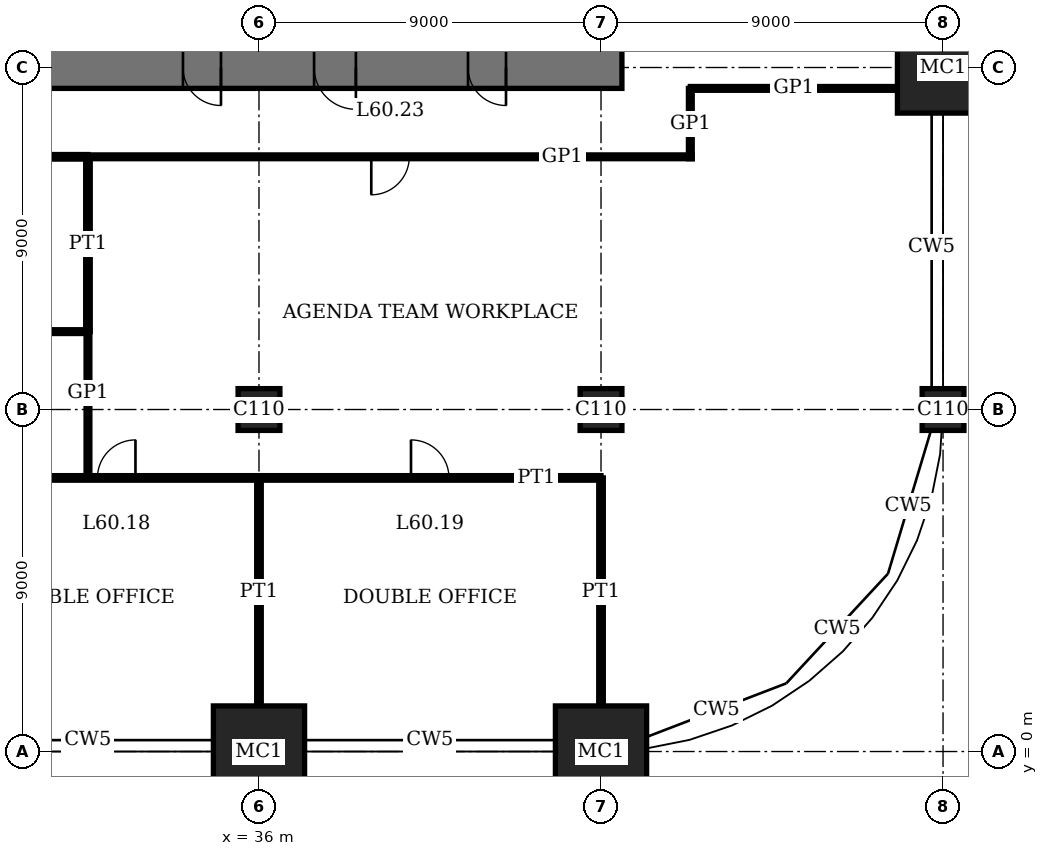
"""IFC4 building model, lengths in metres.
Left out: names, types, materials, properties, quantities, classifications, styles, units other than length and angle.
Written with IfcOpenShell. Run it as: python <this file> out.ifc"""

import sys

from ifc_helpers import new_model, si_unit, direction, frame, frame_2d, origin, origin_2d, place, context, subcontext, project, spatial, rectangle, extrude, element, fill, save


model = new_model("IFC4")
c1 = context("Model", 3, precision=1e-05, world=origin(), true_north=direction((0.0, 1.0)))
c2 = subcontext(c1, "Body", "Model", "MODEL_VIEW")
j1 = project(units=[si_unit("LENGTHUNIT", "METRE"), si_unit("PLANEANGLEUNIT", "RADIAN")], contexts=[c1])
p1 = place(None, origin())
s1 = spatial("IfcSite", under=j1, at=p1, CompositionType="ELEMENT")
p2 = place(p1, origin())
s2 = spatial("IfcBuilding", under=s1, at=p2, CompositionType="ELEMENT")
p3 = place(p2, frame((0.0, 0.0, 247.4)))
s3 = spatial("IfcBuildingStorey", under=s2, at=p3, CompositionType="ELEMENT", Elevation=247.4)
p4 = place(p3, frame((36.0, 0.0, 0.0), z_axis=(0.0, 0.0, 1.0), x_axis=(1.0, 0.0, 0.0)))
e1 = element("IfcColumn", 1, at=p4, inside=s3, PredefinedType="COLUMN", context=c2, shape_type="SweptSolid", body=[
    extrude(rectangle(XDim=2.4, YDim=2.4, at=origin_2d()), origin(), (0.0, 0.0, 1.0), 4.0),
])
p5 = place(p3, frame((36.0, 9.0, 0.0), z_axis=(0.0, 0.0, 1.0), x_axis=(1.0, 0.0, 0.0)))
e2 = element("IfcColumn", 2, at=p5, inside=s3, PredefinedType="COLUMN", context=c2, shape_type="SweptSolid", body=[
    extrude(rectangle(XDim=1.1, YDim=1.1, at=origin_2d()), origin(), (0.0, 0.0, 1.0), 4.0),
])
p6 = place(p3, frame((45.0, 0.0, 0.0), z_axis=(0.0, 0.0, 1.0), x_axis=(1.0, 0.0, 0.0)))
e3 = element("IfcColumn", 3, at=p6, inside=s3, PredefinedType="COLUMN", context=c2, shape_type="SweptSolid", body=[
    extrude(rectangle(XDim=2.4, YDim=2.4, at=origin_2d()), origin(), (0.0, 0.0, 1.0), 4.0),
])
for number, where, z_axis, x_axis in (
    (4, (45.0, 9.0, 0.0), (0.0, 0.0, 1.0), (1.0, 0.0, 0.0)),
    (5, (54.0, 9.0, 0.0), (0.0, 0.0, 1.0), (1.0, 0.0, 0.0)),
):
    element("IfcColumn", number, at=place(p3, frame(where, z_axis=z_axis, x_axis=x_axis)), inside=s3, PredefinedType="COLUMN", context=c2, shape_type="SweptSolid", body=[
        extrude(rectangle(XDim=1.1, YDim=1.1, at=origin_2d()), origin(), (0.0, 0.0, 1.0), 4.0),
    ])
p7 = place(p3, frame((54.0, 18.0, 0.0), z_axis=(0.0, 0.0, 1.0), x_axis=(1.0, 0.0, 0.0)))
e6 = element("IfcColumn", 6, at=p7, inside=s3, PredefinedType="COLUMN", context=c2, shape_type="SweptSolid", body=[
    extrude(rectangle(XDim=2.4, YDim=2.4, at=origin_2d()), origin(), (0.0, 0.0, 1.0), 4.0),
])
p8 = place(p3, frame((17.45, 18.0, 0.0), z_axis=(0.0, 0.0, 1.0), x_axis=(1.0, 0.0, 0.0)))
e7 = element("IfcWall", 7, at=p8, inside=s3, PredefinedType="SHEAR", context=c2, shape_type="SweptSolid", body=[
    extrude(rectangle(XDim=28.1, YDim=1.1, at=frame_2d((14.05, 0.0))), origin(), (0.0, 0.0, 1.0), 4.0),
])
p9 = place(p8, frame((11.55, 0.0, 0.0)))
e8 = element("IfcOpeningElement", 8, at=p9, cuts=e7, PredefinedType="OPENING", context=c2, shape_type="SweptSolid", body=[
    extrude(rectangle(XDim=1.0, YDim=2.4, at=frame_2d((0.5, 1.2))), frame((0.0, 0.56, 0.0), z_axis=(0.0, -1.0, 0.0), x_axis=(1.0, 0.0, 0.0)), (0.0, 0.0, 1.0), 1.12),
])
p10 = place(p8, frame((16.55, 0.0, 0.0)))
e9 = element("IfcOpeningElement", 9, at=p10, cuts=e7, PredefinedType="OPENING", context=c2, shape_type="SweptSolid", body=[
    extrude(rectangle(XDim=1.0, YDim=2.4, at=frame_2d((0.5, 1.2))), frame((0.0, 0.56, 0.0), z_axis=(0.0, -1.0, 0.0), x_axis=(1.0, 0.0, 0.0)), (0.0, 0.0, 1.0), 1.12),
])
p11 = place(p8, frame((20.0, 0.0, 0.0)))
e10 = element("IfcOpeningElement", 10, at=p11, cuts=e7, PredefinedType="OPENING", context=c2, shape_type="SweptSolid", body=[
    extrude(rectangle(XDim=1.1, YDim=2.4, at=frame_2d((0.55, 1.2))), frame((0.0, 0.56, 0.0), z_axis=(0.0, -1.0, 0.0), x_axis=(1.0, 0.0, 0.0)), (0.0, 0.0, 1.0), 1.12),
])
p12 = place(p8, frame((24.05, 0.0, 0.0)))
e11 = element("IfcOpeningElement", 11, at=p12, cuts=e7, PredefinedType="OPENING", context=c2, shape_type="SweptSolid", body=[
    extrude(rectangle(XDim=1.0, YDim=2.4, at=frame_2d((0.5, 1.2))), frame((0.0, 0.56, 0.0), z_axis=(0.0, -1.0, 0.0), x_axis=(1.0, 0.0, 0.0)), (0.0, 0.0, 1.0), 1.12),
])
p13 = place(p3, frame((27.0, 7.2, 0.0), z_axis=(0.0, 0.0, 1.0), x_axis=(1.0, 0.0, 0.0)))
e12 = element("IfcWall", 12, at=p13, inside=s3, PredefinedType="PARTITIONING", context=c2, shape_type="SweptSolid", body=[
    extrude(rectangle(XDim=9.0, YDim=0.12, at=frame_2d((4.5, 0.0))), origin(), (0.0, 0.0, 1.0), 3.75),
])
p14 = place(p13, frame((4.75, 0.0, 0.0)))
e13 = element("IfcOpeningElement", 13, at=p14, cuts=e12, PredefinedType="OPENING", context=c2, shape_type="SweptSolid", body=[
    extrude(rectangle(XDim=1.0, YDim=2.4, at=frame_2d((0.5, 1.2))), frame((0.0, 0.07, 0.0), z_axis=(0.0, -1.0, 0.0), x_axis=(1.0, 0.0, 0.0)), (0.0, 0.0, 1.0), 0.14),
])
p15 = place(p3, frame((36.0, 7.2, 0.0), z_axis=(0.0, 0.0, 1.0), x_axis=(1.0, 0.0, 0.0)))
e14 = element("IfcWall", 14, at=p15, inside=s3, PredefinedType="PARTITIONING", context=c2, shape_type="SweptSolid", body=[
    extrude(rectangle(XDim=9.0, YDim=0.12, at=frame_2d((4.5, 0.0))), origin(), (0.0, 0.0, 1.0), 3.75),
])
p16 = place(p15, frame((4.0, 0.0, 0.0)))
e15 = element("IfcOpeningElement", 15, at=p16, cuts=e14, PredefinedType="OPENING", context=c2, shape_type="SweptSolid", body=[
    extrude(rectangle(XDim=1.0, YDim=2.4, at=frame_2d((0.5, 1.2))), frame((0.0, 0.07, 0.0), z_axis=(0.0, -1.0, 0.0), x_axis=(1.0, 0.0, 0.0)), (0.0, 0.0, 1.0), 0.14),
])
p17 = place(p3, frame((22.5, 11.05, 0.0), z_axis=(0.0, 0.0, 1.0), x_axis=(1.0, 0.0, 0.0)))
e16 = element("IfcWall", 16, at=p17, inside=s3, PredefinedType="PARTITIONING", context=c2, shape_type="SweptSolid", body=[
    extrude(rectangle(XDim=9.0, YDim=0.1, at=frame_2d((4.5, 0.0))), origin(), (0.0, 0.0, 1.0), 3.75),
])
p18 = place(p17, frame((4.0, 0.0, 0.0)))
e17 = element("IfcOpeningElement", 17, at=p18, cuts=e16, PredefinedType="OPENING", context=c2, shape_type="SweptSolid", body=[
    extrude(rectangle(XDim=1.0, YDim=2.4, at=frame_2d((0.5, 1.2))), frame((0.0, 0.06, 0.0), z_axis=(0.0, -1.0, 0.0), x_axis=(1.0, 0.0, 0.0)), (0.0, 0.0, 1.0), 0.12),
])
p19 = place(p3, frame((22.5, 15.65, 0.0), z_axis=(0.0, 0.0, 1.0), x_axis=(1.0, 0.0, 0.0)))
e18 = element("IfcWall", 18, at=p19, inside=s3, PredefinedType="PARTITIONING", context=c2, shape_type="SweptSolid", body=[
    extrude(rectangle(XDim=9.0, YDim=0.12, at=frame_2d((4.5, 0.0))), origin(), (0.0, 0.0, 1.0), 3.75),
])
p20 = place(p3, frame((31.51, 15.65, 0.0), z_axis=(0.0, 0.0, 1.0), x_axis=(1.0, 0.0, 0.0)))
e19 = element("IfcWall", 19, at=p20, inside=s3, PredefinedType="PARTITIONING", context=c2, shape_type="SweptSolid", body=[
    extrude(rectangle(XDim=15.89, YDim=0.1, at=frame_2d((7.945, 0.0))), origin(), (0.0, 0.0, 1.0), 3.75),
])
p21 = place(p20, frame((7.445, 0.0, 0.0)))
e20 = element("IfcOpeningElement", 20, at=p21, cuts=e19, PredefinedType="OPENING", context=c2, shape_type="SweptSolid", body=[
    extrude(rectangle(XDim=1.0, YDim=2.4, at=frame_2d((0.5, 1.2))), frame((0.0, 0.06, 0.0), z_axis=(0.0, -1.0, 0.0), x_axis=(1.0, 0.0, 0.0)), (0.0, 0.0, 1.0), 0.12),
])
p22 = place(p3, frame((47.35, 17.45, 0.0), z_axis=(0.0, 0.0, 1.0), x_axis=(1.0, 0.0, 0.0)))
e21 = element("IfcWall", 21, at=p22, inside=s3, PredefinedType="PARTITIONING", context=c2, shape_type="SweptSolid", body=[
    extrude(rectangle(XDim=5.45, YDim=0.1, at=frame_2d((2.725, 0.0))), origin(), (0.0, 0.0, 1.0), 3.75),
])
p23 = place(p3, frame((31.5, 11.05, 0.0), z_axis=(0.0, 0.0, 1.0), x_axis=(0.0, 1.0, 0.0)))
e22 = element("IfcWall", 22, at=p23, inside=s3, PredefinedType="PARTITIONING", context=c2, shape_type="SweptSolid", body=[
    extrude(rectangle(XDim=4.6, YDim=0.12, at=frame_2d((2.3, 0.0))), origin(), (0.0, 0.0, 1.0), 3.75),
])
p24 = place(p3, frame((31.5, 7.19, 0.0), z_axis=(0.0, 0.0, 1.0), x_axis=(0.0, 1.0, 0.0)))
e23 = element("IfcWall", 23, at=p24, inside=s3, PredefinedType="PARTITIONING", context=c2, shape_type="SweptSolid", body=[
    extrude(rectangle(XDim=3.86, YDim=0.1, at=frame_2d((1.93, 0.0))), origin(), (0.0, 0.0, 1.0), 3.75),
])
for number, where, z_axis, x_axis in (
    (24, (36.0, 1.2, 0.0), (0.0, 0.0, 1.0), (0.0, 1.0, 0.0)),
    (25, (45.0, 1.2, 0.0), (0.0, 0.0, 1.0), (0.0, 1.0, 0.0)),
):
    element("IfcWall", number, at=place(p3, frame(where, z_axis=z_axis, x_axis=x_axis)), inside=s3, PredefinedType="PARTITIONING", context=c2, shape_type="SweptSolid", body=[
        extrude(rectangle(XDim=6.0, YDim=0.12, at=frame_2d((3.0, 0.0))), origin(), (0.0, 0.0, 1.0), 3.05),
    ])
p25 = place(p3, frame((47.35, 15.6, 0.0), z_axis=(0.0, 0.0, 1.0), x_axis=(0.0, 1.0, 0.0)))
e26 = element("IfcWall", 26, at=p25, inside=s3, PredefinedType="PARTITIONING", context=c2, shape_type="SweptSolid", body=[
    extrude(rectangle(XDim=1.85, YDim=0.1, at=frame_2d((0.925, 0.0))), origin(), (0.0, 0.0, 1.0), 3.75),
])
p26 = place(p10, origin())
e27 = element("IfcDoor", 27, at=p26, inside=s3, OperationType="SINGLE_SWING_RIGHT", PredefinedType="DOOR", context=c2, shape_type="SweptSolid", body=[
    extrude(rectangle(XDim=1.0, YDim=2.4, at=frame_2d((0.5, 1.2))), frame((0.0, 0.025, 0.0), z_axis=(0.0, -1.0, 0.0), x_axis=(1.0, 0.0, 0.0)), (0.0, 0.0, 1.0), 0.05),
    extrude(rectangle(XDim=0.04, YDim=2.4, at=frame_2d((0.02, 1.2))), frame((0.0, 0.4, 0.0), z_axis=(0.0, -1.0, 0.0), x_axis=(1.0, 0.0, 0.0)), (0.0, 0.0, 1.0), 0.8),
    extrude(rectangle(XDim=0.04, YDim=2.4, at=frame_2d((0.98, 1.2))), frame((0.0, 0.4, 0.0), z_axis=(0.0, -1.0, 0.0), x_axis=(1.0, 0.0, 0.0)), (0.0, 0.0, 1.0), 0.8),
    extrude(rectangle(XDim=1.0, YDim=0.04, at=frame_2d((0.5, 2.38))), frame((0.0, 0.4, 0.0), z_axis=(0.0, -1.0, 0.0), x_axis=(1.0, 0.0, 0.0)), (0.0, 0.0, 1.0), 0.8),
])
fill(e9, e27)
p27 = place(p11, origin())
e28 = element("IfcDoor", 28, at=p27, inside=s3, OperationType="SINGLE_SWING_RIGHT", PredefinedType="DOOR", context=c2, shape_type="SweptSolid", body=[
    extrude(rectangle(XDim=1.1, YDim=2.4, at=frame_2d((0.55, 1.2))), frame((0.0, 0.025, 0.0), z_axis=(0.0, -1.0, 0.0), x_axis=(1.0, 0.0, 0.0)), (0.0, 0.0, 1.0), 0.05),
    extrude(rectangle(XDim=0.04, YDim=2.4, at=frame_2d((0.02, 1.2))), frame((0.0, 0.44, 0.0), z_axis=(0.0, -1.0, 0.0), x_axis=(1.0, 0.0, 0.0)), (0.0, 0.0, 1.0), 0.88),
    extrude(rectangle(XDim=0.04, YDim=2.4, at=frame_2d((1.08, 1.2))), frame((0.0, 0.44, 0.0), z_axis=(0.0, -1.0, 0.0), x_axis=(1.0, 0.0, 0.0)), (0.0, 0.0, 1.0), 0.88),
    extrude(rectangle(XDim=1.1, YDim=0.04, at=frame_2d((0.55, 2.38))), frame((0.0, 0.44, 0.0), z_axis=(0.0, -1.0, 0.0), x_axis=(1.0, 0.0, 0.0)), (0.0, 0.0, 1.0), 0.88),
])
fill(e10, e28)
p28 = place(p12, origin())
e29 = element("IfcDoor", 29, at=p28, inside=s3, OperationType="SINGLE_SWING_RIGHT", PredefinedType="DOOR", context=c2, shape_type="SweptSolid", body=[
    extrude(rectangle(XDim=1.0, YDim=2.4, at=frame_2d((0.5, 1.2))), frame((0.0, 0.025, 0.0), z_axis=(0.0, -1.0, 0.0), x_axis=(1.0, 0.0, 0.0)), (0.0, 0.0, 1.0), 0.05),
    extrude(rectangle(XDim=0.04, YDim=2.4, at=frame_2d((0.02, 1.2))), frame((0.0, 0.4, 0.0), z_axis=(0.0, -1.0, 0.0), x_axis=(1.0, 0.0, 0.0)), (0.0, 0.0, 1.0), 0.8),
    extrude(rectangle(XDim=0.04, YDim=2.4, at=frame_2d((0.98, 1.2))), frame((0.0, 0.4, 0.0), z_axis=(0.0, -1.0, 0.0), x_axis=(1.0, 0.0, 0.0)), (0.0, 0.0, 1.0), 0.8),
    extrude(rectangle(XDim=1.0, YDim=0.04, at=frame_2d((0.5, 2.38))), frame((0.0, 0.4, 0.0), z_axis=(0.0, -1.0, 0.0), x_axis=(1.0, 0.0, 0.0)), (0.0, 0.0, 1.0), 0.8),
])
fill(e11, e29)
p29 = place(p14, origin())
e30 = element("IfcDoor", 30, at=p29, inside=s3, OperationType="SINGLE_SWING_LEFT", PredefinedType="DOOR", context=c2, shape_type="SweptSolid", body=[
    extrude(rectangle(XDim=1.0, YDim=2.4, at=frame_2d((0.5, 1.2))), frame((0.0, 0.025, 0.0), z_axis=(0.0, -1.0, 0.0), x_axis=(1.0, 0.0, 0.0)), (0.0, 0.0, 1.0), 0.05),
])
fill(e13, e30)
p30 = place(p16, origin())
e31 = element("IfcDoor", 31, at=p30, inside=s3, OperationType="SINGLE_SWING_RIGHT", PredefinedType="DOOR", context=c2, shape_type="SweptSolid", body=[
    extrude(rectangle(XDim=1.0, YDim=2.4, at=frame_2d((0.5, 1.2))), frame((0.0, 0.025, 0.0), z_axis=(0.0, -1.0, 0.0), x_axis=(1.0, 0.0, 0.0)), (0.0, 0.0, 1.0), 0.05),
])
fill(e15, e31)
p31 = place(p21, origin())
e32 = element("IfcDoor", 32, at=p31, inside=s3, OperationType="SINGLE_SWING_LEFT", PredefinedType="DOOR", context=c2, shape_type="SweptSolid", body=[
    extrude(rectangle(XDim=1.0, YDim=2.4, at=frame_2d((0.5, 1.2))), frame((0.0, 0.02, 0.0), z_axis=(0.0, -1.0, 0.0), x_axis=(1.0, 0.0, 0.0)), (0.0, 0.0, 1.0), 0.04),
])
fill(e20, e32)
save(model, sys.argv[1])
